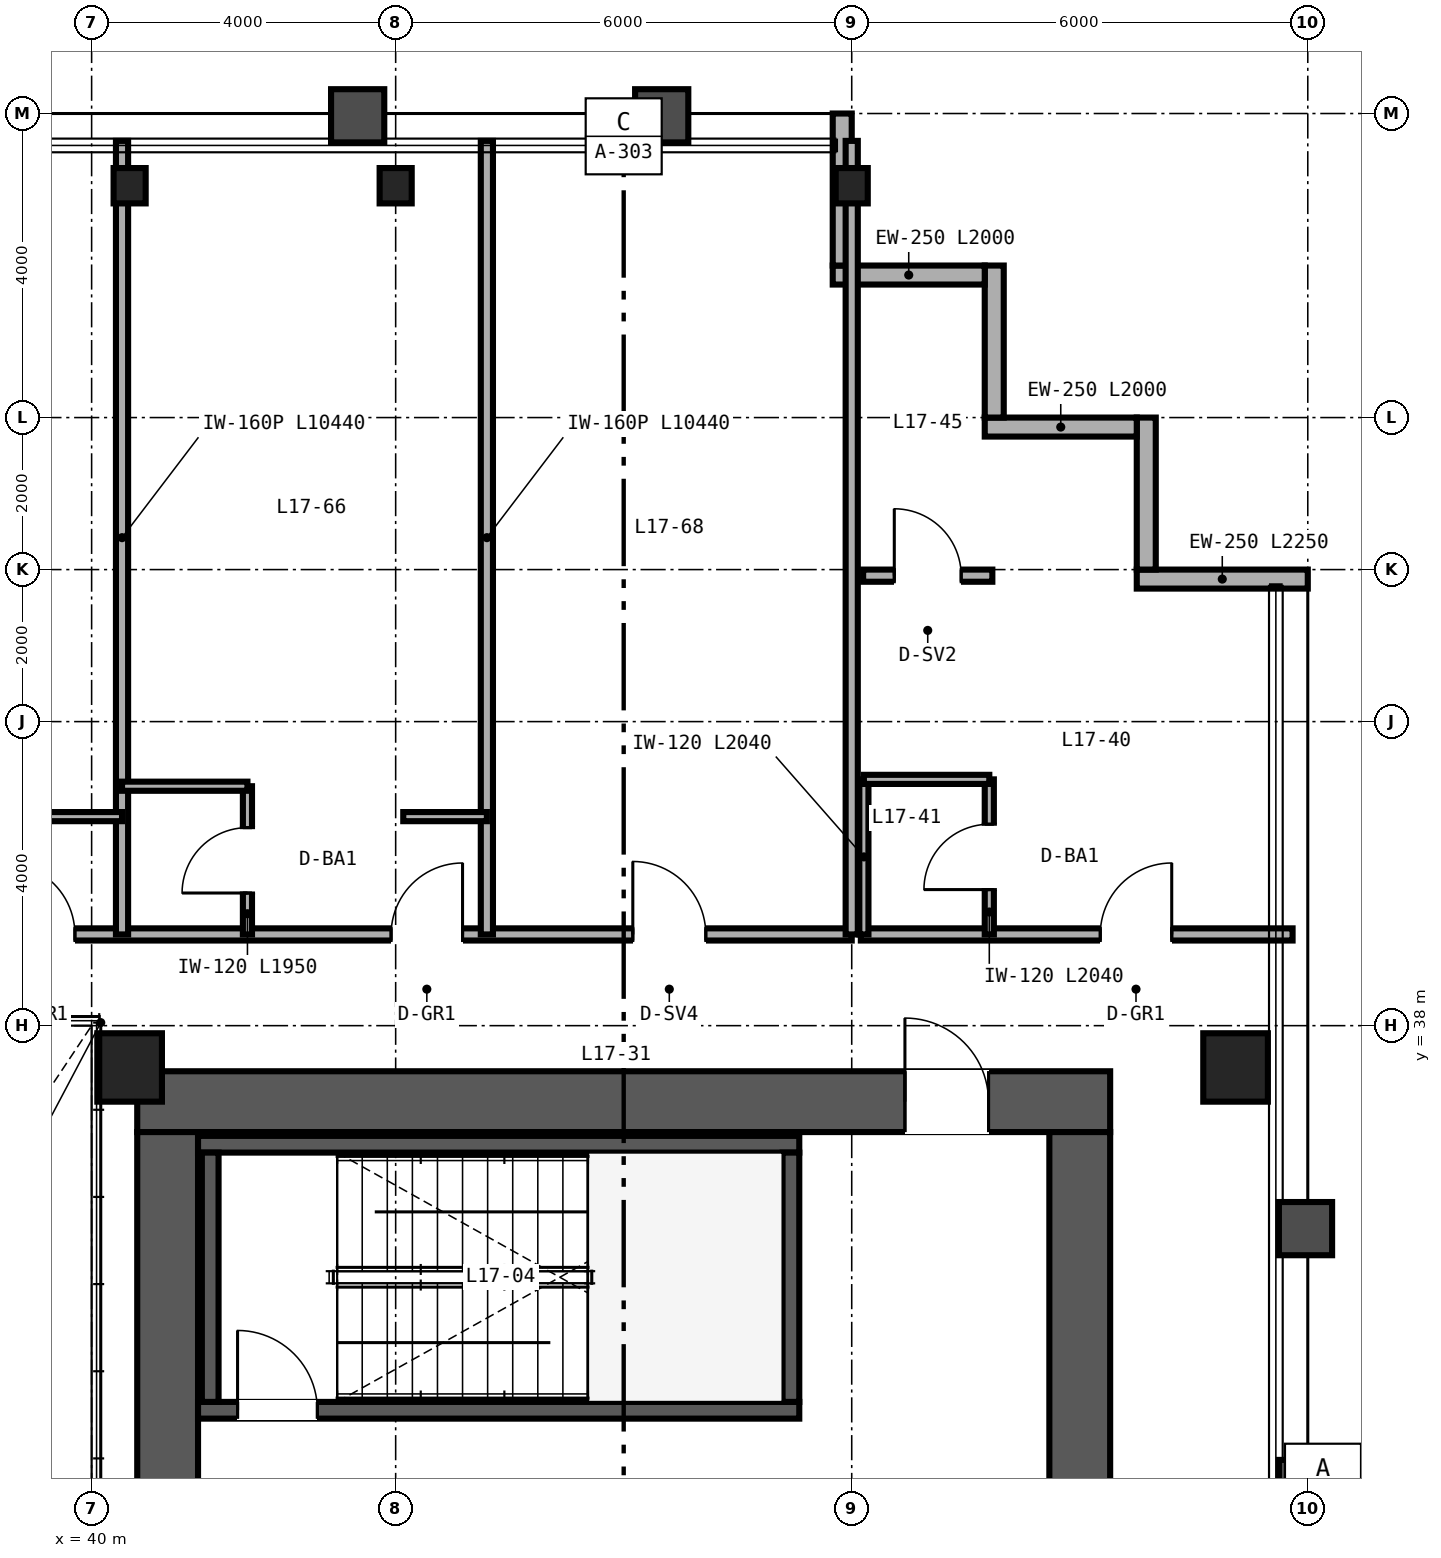
"""IFC4 building model, lengths in metres.
Left out: names, types, materials, properties, quantities, classifications, styles, units other than length and angle.
Written with IfcOpenShell. Run it as: python <this file> out.ifc"""

import sys

from ifc_helpers import new_model, si_unit, direction, frame, frame_2d, origin, origin_2d, place, context, subcontext, project, spatial, rectangle, hollow_rectangle, i_section, extrude, source, transform, mapped, element, fill, save


model = new_model("IFC4")
c1 = context("Model", 3, precision=1e-05, world=origin(), true_north=direction((0.0, 1.0)))
c2 = subcontext(c1, "Body", "Model", "MODEL_VIEW")
j1 = project(units=[si_unit("LENGTHUNIT", "METRE"), si_unit("PLANEANGLEUNIT", "RADIAN")], contexts=[c1])
p1 = place(None, origin())
s1 = spatial("IfcSite", under=j1, at=p1, CompositionType="ELEMENT")
p2 = place(p1, origin())
s2 = spatial("IfcBuilding", under=s1, at=p2, CompositionType="ELEMENT")
p3 = place(p2, frame((0.0, 0.0, 70.8)))
s3 = spatial("IfcBuildingStorey", under=s2, at=p3, CompositionType="ELEMENT", Elevation=70.8)
p4 = place(p3, frame((40.6, 37.0, 0.0), z_axis=(0.0, 0.0, 1.0), x_axis=(1.0, 0.0, 0.0)))
e1 = element("IfcWall", 1, at=p4, inside=s3, PredefinedType="SHEAR", context=c2, shape_type="SweptSolid", body=[
    extrude(rectangle(XDim=12.8, YDim=0.8, at=frame_2d((6.4, 0.0))), origin(), (0.0, 0.0, 1.0), 3.35),
])
p5 = place(p4, frame((10.1, 0.0, 0.0)))
e2 = element("IfcOpeningElement", 2, at=p5, cuts=e1, PredefinedType="OPENING", context=c2, shape_type="SweptSolid", body=[
    extrude(rectangle(XDim=1.1, YDim=2.15, at=frame_2d((0.55, 1.075))), frame((0.0, 0.41, 0.0), z_axis=(0.0, -1.0, 0.0), x_axis=(1.0, 0.0, 0.0)), (0.0, 0.0, 1.0), 0.82),
])
for number, where, z_axis, x_axis in (
    (3, (41.0, 15.4, 0.0), (0.0, 0.0, 1.0), (0.0, 1.0, 0.0)),
    (4, (53.0, 15.4, 0.0), (0.0, 0.0, 1.0), (0.0, 1.0, 0.0)),
):
    element("IfcWall", number, at=place(p3, frame(where, z_axis=z_axis, x_axis=x_axis)), inside=s3, PredefinedType="SHEAR", context=c2, shape_type="SweptSolid", body=[
        extrude(rectangle(XDim=21.2, YDim=0.8, at=frame_2d((10.6, 0.0))), origin(), (0.0, 0.0, 1.0), 3.35),
    ])
p6 = place(p3, frame((41.4, 32.94, 0.0), z_axis=(0.0, 0.0, 1.0), x_axis=(1.0, 0.0, 0.0)))
e5 = element("IfcWall", 5, at=p6, inside=s3, PredefinedType="SHEAR", context=c2, shape_type="SweptSolid", body=[
    extrude(rectangle(XDim=7.91, YDim=0.22, at=frame_2d((3.955, 0.0))), origin(), (0.0, 0.0, 1.0), 3.4),
])
p7 = place(p6, frame((0.52, 0.0, 0.0)))
e6 = element("IfcOpeningElement", 6, at=p7, cuts=e5, PredefinedType="OPENING", context=c2, shape_type="SweptSolid", body=[
    extrude(rectangle(XDim=1.05, YDim=2.15, at=frame_2d((0.525, 1.075))), frame((0.0, 0.12, 0.0), z_axis=(0.0, -1.0, 0.0), x_axis=(1.0, 0.0, 0.0)), (0.0, 0.0, 1.0), 0.24),
])
p8 = place(p3, frame((41.4, 36.44, 0.0), z_axis=(0.0, 0.0, 1.0), x_axis=(1.0, 0.0, 0.0)))
e7 = element("IfcWall", 7, at=p8, inside=s3, PredefinedType="SHEAR", context=c2, shape_type="SweptSolid", body=[
    extrude(rectangle(XDim=7.91, YDim=0.22, at=frame_2d((3.955, 0.0))), origin(), (0.0, 0.0, 1.0), 3.4),
])
for number, where, z_axis, x_axis in (
    (8, (41.56, 33.05, 0.0), (0.0, 0.0, 1.0), (0.0, 1.0, 0.0)),
    (9, (49.2, 33.05, 0.0), (0.0, 0.0, 1.0), (0.0, 1.0, 0.0)),
):
    element("IfcWall", number, at=place(p3, frame(where, z_axis=z_axis, x_axis=x_axis)), inside=s3, PredefinedType="SHEAR", context=c2, shape_type="SweptSolid", body=[
        extrude(rectangle(XDim=3.28, YDim=0.22, at=frame_2d((1.64, 0.0))), origin(), (0.0, 0.0, 1.0), 3.4),
    ])
m1 = source(origin(), c2, "Body", "SweptSolid", [
    extrude(hollow_rectangle(XDim=0.85, YDim=0.9, WallThickness=0.04, at=origin_2d()), origin(), (0.0, 0.0, 1.0), 3.35),
])
for number, where, z_axis, x_axis in (
    (10, (40.5, 37.45, 0.0), (0.0, 0.0, 1.0), (1.0, 0.0, 0.0)),
    (11, (55.05, 37.45, 0.0), (0.0, 0.0, 1.0), (1.0, 0.0, 0.0)),
):
    element("IfcColumn", number, at=place(p3, frame(where, z_axis=z_axis, x_axis=x_axis)), inside=s3, PredefinedType="COLUMN", context=c2, shape_type="MappedRepresentation", body=[
        mapped(m1, transform((0.0, 0.0, 0.0), scale=1.0)),
    ])
m2 = source(origin(), c2, "Body", "SweptSolid", [
    extrude(i_section(OverallWidth=0.422, OverallDepth=0.465, WebThickness=0.045, FlangeThickness=0.073, FilletRadius=0.025, at=origin_2d()), origin(), (0.0, 0.0, 1.0), 3.35),
])
for number, where, z_axis, x_axis in (
    (12, (40.5, 49.05, 0.0), (0.0, 0.0, 1.0), (1.0, 0.0, 0.0)),
    (13, (44.0, 49.05, 0.0), (0.0, 0.0, 1.0), (1.0, 0.0, 0.0)),
    (14, (50.0, 49.05, 0.0), (0.0, 0.0, 1.0), (1.0, 0.0, 0.0)),
):
    element("IfcColumn", number, at=place(p3, frame(where, z_axis=z_axis, x_axis=x_axis)), inside=s3, PredefinedType="COLUMN", context=c2, shape_type="MappedRepresentation", body=[
        mapped(m2, transform((0.0, 0.0, 0.0), scale=1.0)),
    ])
p9 = place(p3, frame((56.0, 43.875, 0.0), z_axis=(0.0, 0.0, 1.0), x_axis=(-1.0, 0.0, 0.0)))
e15 = element("IfcWall", 15, at=p9, inside=s3, PredefinedType="SOLIDWALL", context=c2, shape_type="SweptSolid", body=[
    extrude(rectangle(XDim=2.25, YDim=0.25, at=frame_2d((1.125, 0.0))), origin(), (0.0, 0.0, 1.0), 3.35),
])
for number, where, z_axis, x_axis in (
    (16, (53.875, 44.0, 0.0), (0.0, 0.0, 1.0), (0.0, 1.0, 0.0)),
    (17, (53.75, 45.875, 0.0), (0.0, 0.0, 1.0), (-1.0, 0.0, 0.0)),
    (18, (51.875, 46.0, 0.0), (0.0, 0.0, 1.0), (0.0, 1.0, 0.0)),
    (19, (51.75, 47.875, 0.0), (0.0, 0.0, 1.0), (-1.0, 0.0, 0.0)),
):
    element("IfcWall", number, at=place(p3, frame(where, z_axis=z_axis, x_axis=x_axis)), inside=s3, PredefinedType="SOLIDWALL", context=c2, shape_type="SweptSolid", body=[
        extrude(rectangle(XDim=2.0, YDim=0.25, at=frame_2d((1.0, 0.0))), origin(), (0.0, 0.0, 1.0), 3.35),
    ])
p10 = place(p3, frame((49.875, 48.0, 0.0), z_axis=(0.0, 0.0, 1.0), x_axis=(0.0, 1.0, 0.0)))
e20 = element("IfcWall", 20, at=p10, inside=s3, PredefinedType="SOLIDWALL", context=c2, shape_type="SweptSolid", body=[
    extrude(rectangle(XDim=2.0, YDim=0.25, at=frame_2d((1.0, 0.0))), origin(), (0.0, 0.0, 1.0), 2.657),
])
p11 = place(p3, frame((50.12, 39.2, 0.0), z_axis=(0.0, 0.0, 1.0), x_axis=(1.0, 0.0, 0.0)))
e21 = element("IfcWall", 21, at=p11, inside=s3, PredefinedType="PARTITIONING", context=c2, shape_type="SweptSolid", body=[
    extrude(rectangle(XDim=5.68, YDim=0.16, at=frame_2d((2.84, 0.0))), origin(), (0.0, 0.0, 1.0), 3.35),
])
p12 = place(p11, frame((3.15, 0.0, 0.0)))
e22 = element("IfcOpeningElement", 22, at=p12, cuts=e21, PredefinedType="OPENING", context=c2, shape_type="SweptSolid", body=[
    extrude(rectangle(XDim=0.94, YDim=2.15, at=frame_2d((0.47, 1.075))), frame((0.0, 0.09, 0.0), z_axis=(0.0, -1.0, 0.0), x_axis=(1.0, 0.0, 0.0)), (0.0, 0.0, 1.0), 0.18),
])
p13 = place(p3, frame((51.81, 39.2, 0.0), z_axis=(0.0, 0.0, 1.0), x_axis=(0.0, 1.0, 0.0)))
e23 = element("IfcWall", 23, at=p13, inside=s3, PredefinedType="PARTITIONING", context=c2, shape_type="SweptSolid", body=[
    extrude(rectangle(XDim=2.04, YDim=0.12, at=frame_2d((1.02, 0.0))), origin(), (0.0, 0.0, 1.0), 3.35),
])
p14 = place(p13, frame((0.59, 0.0, 0.0)))
e24 = element("IfcOpeningElement", 24, at=p14, cuts=e23, PredefinedType="OPENING", context=c2, shape_type="SweptSolid", body=[
    extrude(rectangle(XDim=0.86, YDim=2.1, at=frame_2d((0.43, 1.05))), frame((0.0, 0.07, 0.0), z_axis=(0.0, -1.0, 0.0), x_axis=(1.0, 0.0, 0.0)), (0.0, 0.0, 1.0), 0.14),
])
p15 = place(p3, frame((50.16, 39.2, 0.0), z_axis=(0.0, 0.0, 1.0), x_axis=(0.0, 1.0, 0.0)))
e25 = element("IfcWall", 25, at=p15, inside=s3, PredefinedType="PARTITIONING", context=c2, shape_type="SweptSolid", body=[
    extrude(rectangle(XDim=2.04, YDim=0.12, at=frame_2d((1.02, 0.0))), origin(), (0.0, 0.0, 1.0), 3.35),
])
p16 = place(p3, frame((50.16, 41.24, 0.0), z_axis=(0.0, 0.0, 1.0), x_axis=(1.0, 0.0, 0.0)))
e26 = element("IfcWall", 26, at=p16, inside=s3, PredefinedType="PARTITIONING", context=c2, shape_type="SweptSolid", body=[
    extrude(rectangle(XDim=1.65, YDim=0.12, at=frame_2d((0.825, 0.0))), origin(), (0.0, 0.0, 1.0), 3.35),
])
p17 = place(p3, frame((50.15, 43.92, 0.0), z_axis=(0.0, 0.0, 1.0), x_axis=(1.0, 0.0, 0.0)))
e27 = element("IfcWall", 27, at=p17, inside=s3, PredefinedType="PARTITIONING", context=c2, shape_type="SweptSolid", body=[
    extrude(rectangle(XDim=1.7, YDim=0.16, at=frame_2d((0.85, 0.0))), origin(), (0.0, 0.0, 1.0), 3.35),
])
p18 = place(p17, frame((0.41, 0.0, 0.0)))
e28 = element("IfcOpeningElement", 28, at=p18, cuts=e27, PredefinedType="OPENING", context=c2, shape_type="SweptSolid", body=[
    extrude(rectangle(XDim=0.88, YDim=2.15, at=frame_2d((0.44, 1.075))), frame((0.0, 0.09, 0.0), z_axis=(0.0, -1.0, 0.0), x_axis=(1.0, 0.0, 0.0)), (0.0, 0.0, 1.0), 0.18),
])
p19 = place(p3, frame((14.0, 39.2, 0.0), z_axis=(0.0, 0.0, 1.0), x_axis=(1.0, 0.0, 0.0)))
e29 = element("IfcWall", 29, at=p19, inside=s3, PredefinedType="PARTITIONING", context=c2, shape_type="SweptSolid", body=[
    extrude(rectangle(XDim=36.0, YDim=0.16, at=frame_2d((18.0, 0.0))), origin(), (0.0, 0.0, 1.0), 2.571),
])
p20 = place(p19, frame((3.74, 0.0, 0.0)))
e30 = element("IfcOpeningElement", 30, at=p20, cuts=e29, PredefinedType="OPENING", context=c2, shape_type="SweptSolid", body=[
    extrude(rectangle(XDim=0.94, YDim=2.15, at=frame_2d((0.47, 1.075))), frame((0.0, 0.09, 0.0), z_axis=(0.0, -1.0, 0.0), x_axis=(1.0, 0.0, 0.0)), (0.0, 0.0, 1.0), 0.18),
])
p21 = place(p19, frame((7.79, 0.0, 0.0)))
e31 = element("IfcOpeningElement", 31, at=p21, cuts=e29, PredefinedType="OPENING", context=c2, shape_type="SweptSolid", body=[
    extrude(rectangle(XDim=0.94, YDim=2.15, at=frame_2d((0.47, 1.075))), frame((0.0, 0.09, 0.0), z_axis=(0.0, -1.0, 0.0), x_axis=(1.0, 0.0, 0.0)), (0.0, 0.0, 1.0), 0.18),
])
p22 = place(p19, frame((12.22, 0.0, 0.0)))
e32 = element("IfcOpeningElement", 32, at=p22, cuts=e29, PredefinedType="OPENING", context=c2, shape_type="SweptSolid", body=[
    extrude(rectangle(XDim=0.96, YDim=2.15, at=frame_2d((0.48, 1.075))), frame((0.0, 0.09, 0.0), z_axis=(0.0, -1.0, 0.0), x_axis=(1.0, 0.0, 0.0)), (0.0, 0.0, 1.0), 0.18),
])
p23 = place(p19, frame((19.94, 0.0, 0.0)))
e33 = element("IfcOpeningElement", 33, at=p23, cuts=e29, PredefinedType="OPENING", context=c2, shape_type="SweptSolid", body=[
    extrude(rectangle(XDim=0.94, YDim=2.15, at=frame_2d((0.47, 1.075))), frame((0.0, 0.09, 0.0), z_axis=(0.0, -1.0, 0.0), x_axis=(1.0, 0.0, 0.0)), (0.0, 0.0, 1.0), 0.18),
])
p24 = place(p19, frame((24.84, 0.0, 0.0)))
e34 = element("IfcOpeningElement", 34, at=p24, cuts=e29, PredefinedType="OPENING", context=c2, shape_type="SweptSolid", body=[
    extrude(rectangle(XDim=0.94, YDim=2.15, at=frame_2d((0.47, 1.075))), frame((0.0, 0.09, 0.0), z_axis=(0.0, -1.0, 0.0), x_axis=(1.0, 0.0, 0.0)), (0.0, 0.0, 1.0), 0.18),
])
p25 = place(p19, frame((29.94, 0.0, 0.0)))
e35 = element("IfcOpeningElement", 35, at=p25, cuts=e29, PredefinedType="OPENING", context=c2, shape_type="SweptSolid", body=[
    extrude(rectangle(XDim=0.94, YDim=2.15, at=frame_2d((0.47, 1.075))), frame((0.0, 0.09, 0.0), z_axis=(0.0, -1.0, 0.0), x_axis=(1.0, 0.0, 0.0)), (0.0, 0.0, 1.0), 0.18),
])
p26 = place(p19, frame((33.12, 0.0, 0.0)))
e36 = element("IfcOpeningElement", 36, at=p26, cuts=e29, PredefinedType="OPENING", context=c2, shape_type="SweptSolid", body=[
    extrude(rectangle(XDim=0.96, YDim=2.15, at=frame_2d((0.48, 1.075))), frame((0.0, 0.09, 0.0), z_axis=(0.0, -1.0, 0.0), x_axis=(1.0, 0.0, 0.0)), (0.0, 0.0, 1.0), 0.18),
])
p27 = place(p3, frame((50.0, 39.2, 0.0), z_axis=(0.0, 0.0, 1.0), x_axis=(0.0, 1.0, 0.0)))
e37 = element("IfcWall", 37, at=p27, inside=s3, PredefinedType="PARTITIONING", context=c2, shape_type="SweptSolid", body=[
    extrude(rectangle(XDim=10.44, YDim=0.16, at=frame_2d((5.22, 0.0))), origin(), (0.0, 0.0, 1.0), 2.657),
])
p28 = place(p3, frame((40.4, 39.2, 0.0), z_axis=(0.0, 0.0, 1.0), x_axis=(0.0, 1.0, 0.0)))
e38 = element("IfcWall", 38, at=p28, inside=s3, PredefinedType="PARTITIONING", context=c2, shape_type="SweptSolid", body=[
    extrude(rectangle(XDim=10.44, YDim=0.16, at=frame_2d((5.22, 0.0))), origin(), (0.0, 0.0, 1.0), 2.423),
])
p29 = place(p3, frame((39.3, 40.75, 0.0), z_axis=(0.0, 0.0, 1.0), x_axis=(1.0, 0.0, 0.0)))
e39 = element("IfcWall", 39, at=p29, inside=s3, PredefinedType="PARTITIONING", context=c2, shape_type="SweptSolid", body=[
    extrude(rectangle(XDim=1.1, YDim=0.12, at=frame_2d((0.55, 0.0))), origin(), (0.0, 0.0, 1.0), 2.571),
])
p30 = place(p3, frame((45.2, 39.2, 0.0), z_axis=(0.0, 0.0, 1.0), x_axis=(0.0, 1.0, 0.0)))
e40 = element("IfcWall", 40, at=p30, inside=s3, PredefinedType="PARTITIONING", context=c2, shape_type="SweptSolid", body=[
    extrude(rectangle(XDim=10.44, YDim=0.16, at=frame_2d((5.22, 0.0))), origin(), (0.0, 0.0, 1.0), 2.657),
])
p31 = place(p3, frame((42.05, 39.2, 0.0), z_axis=(0.0, 0.0, 1.0), x_axis=(0.0, 1.0, 0.0)))
e41 = element("IfcWall", 41, at=p31, inside=s3, PredefinedType="PARTITIONING", context=c2, shape_type="SweptSolid", body=[
    extrude(rectangle(XDim=1.95, YDim=0.12, at=frame_2d((0.975, 0.0))), origin(), (0.0, 0.0, 1.0), 3.35),
])
p32 = place(p31, frame((0.545, 0.0, 0.0)))
e42 = element("IfcOpeningElement", 42, at=p32, cuts=e41, PredefinedType="OPENING", context=c2, shape_type="SweptSolid", body=[
    extrude(rectangle(XDim=0.86, YDim=2.1, at=frame_2d((0.43, 1.05))), frame((0.0, 0.07, 0.0), z_axis=(0.0, -1.0, 0.0), x_axis=(1.0, 0.0, 0.0)), (0.0, 0.0, 1.0), 0.14),
])
p33 = place(p3, frame((40.4, 41.15, 0.0), z_axis=(0.0, 0.0, 1.0), x_axis=(1.0, 0.0, 0.0)))
e43 = element("IfcWall", 43, at=p33, inside=s3, PredefinedType="PARTITIONING", context=c2, shape_type="SweptSolid", body=[
    extrude(rectangle(XDim=1.65, YDim=0.12, at=frame_2d((0.825, 0.0))), origin(), (0.0, 0.0, 1.0), 2.571),
])
p34 = place(p3, frame((44.1, 40.75, 0.0), z_axis=(0.0, 0.0, 1.0), x_axis=(1.0, 0.0, 0.0)))
e44 = element("IfcWall", 44, at=p34, inside=s3, PredefinedType="PARTITIONING", context=c2, shape_type="SweptSolid", body=[
    extrude(rectangle(XDim=1.1, YDim=0.12, at=frame_2d((0.55, 0.0))), origin(), (0.0, 0.0, 1.0), 3.35),
])
m3 = source(origin(), c2, "Body", "SweptSolid", [
    extrude(rectangle(XDim=1.05, YDim=2.15, at=frame_2d((0.525, 1.075))), frame((0.0, 0.025, 0.0), z_axis=(0.0, -1.0, 0.0), x_axis=(1.0, 0.0, 0.0)), (0.0, 0.0, 1.0), 0.05),
])
p35 = place(p7, origin())
e45 = element("IfcDoor", 45, at=p35, inside=s3, OperationType="SINGLE_SWING_LEFT", PredefinedType="DOOR", context=c2, shape_type="MappedRepresentation", body=[
    mapped(m3, transform((0.0, 0.0, 0.0), scale=1.0)),
])
fill(e6, e45)
m4 = source(origin(), c2, "Body", "SweptSolid", [
    extrude(rectangle(XDim=1.1, YDim=2.15, at=frame_2d((0.55, 1.075))), frame((0.0, 0.025, 0.0), z_axis=(0.0, -1.0, 0.0), x_axis=(1.0, 0.0, 0.0)), (0.0, 0.0, 1.0), 0.05),
])
p36 = place(p5, origin())
e46 = element("IfcDoor", 46, at=p36, inside=s3, OperationType="SINGLE_SWING_LEFT", PredefinedType="DOOR", context=c2, shape_type="MappedRepresentation", body=[
    mapped(m4, transform((0.0, 0.0, 0.0), scale=1.0)),
])
fill(e2, e46)
m5 = source(origin(), c2, "Body", "SweptSolid", [
    extrude(rectangle(XDim=0.86, YDim=2.1, at=frame_2d((0.43, 1.05))), frame((0.0, 0.025, 0.0), z_axis=(0.0, -1.0, 0.0), x_axis=(1.0, 0.0, 0.0)), (0.0, 0.0, 1.0), 0.05),
])
p37 = place(p14, origin())
e47 = element("IfcDoor", 47, at=p37, inside=s3, OperationType="SINGLE_SWING_LEFT", PredefinedType="DOOR", context=c2, shape_type="MappedRepresentation", body=[
    mapped(m5, transform((0.0, 0.0, 0.0), scale=1.0)),
])
fill(e24, e47)
m6 = source(origin(), c2, "Body", "SweptSolid", [
    extrude(rectangle(XDim=0.94, YDim=2.15, at=frame_2d((0.47, 1.075))), frame((0.0, 0.025, 0.0), z_axis=(0.0, -1.0, 0.0), x_axis=(1.0, 0.0, 0.0)), (0.0, 0.0, 1.0), 0.05),
])
p38 = place(p12, origin())
e48 = element("IfcDoor", 48, at=p38, inside=s3, OperationType="SINGLE_SWING_RIGHT", PredefinedType="DOOR", context=c2, shape_type="MappedRepresentation", body=[
    mapped(m6, transform((0.0, 0.0, 0.0), scale=1.0)),
])
fill(e22, e48)
m7 = source(origin(), c2, "Body", "SweptSolid", [
    extrude(rectangle(XDim=0.88, YDim=2.15, at=frame_2d((0.44, 1.075))), frame((0.0, 0.025, 0.0), z_axis=(0.0, -1.0, 0.0), x_axis=(1.0, 0.0, 0.0)), (0.0, 0.0, 1.0), 0.05),
])
p39 = place(p18, origin())
e49 = element("IfcDoor", 49, at=p39, inside=s3, OperationType="SINGLE_SWING_LEFT", PredefinedType="DOOR", context=c2, shape_type="MappedRepresentation", body=[
    mapped(m7, transform((0.0, 0.0, 0.0), scale=1.0)),
])
fill(e28, e49)
p40 = place(p32, origin())
e50 = element("IfcDoor", 50, at=p40, inside=s3, OperationType="SINGLE_SWING_LEFT", PredefinedType="DOOR", context=c2, shape_type="MappedRepresentation", body=[
    mapped(m5, transform((0.0, 0.0, 0.0), scale=1.0)),
])
fill(e42, e50)
p41 = place(p24, origin())
e51 = element("IfcDoor", 51, at=p41, inside=s3, OperationType="SINGLE_SWING_LEFT", PredefinedType="DOOR", context=c2, shape_type="MappedRepresentation", body=[
    mapped(m6, transform((0.0, 0.0, 0.0), scale=1.0)),
])
fill(e34, e51)
p42 = place(p25, origin())
e52 = element("IfcDoor", 52, at=p42, inside=s3, OperationType="SINGLE_SWING_RIGHT", PredefinedType="DOOR", context=c2, shape_type="MappedRepresentation", body=[
    mapped(m6, transform((0.0, 0.0, 0.0), scale=1.0)),
])
fill(e35, e52)
m8 = source(origin(), c2, "Body", "SweptSolid", [
    extrude(rectangle(XDim=0.96, YDim=2.15, at=frame_2d((0.48, 1.075))), frame((0.0, 0.025, 0.0), z_axis=(0.0, -1.0, 0.0), x_axis=(1.0, 0.0, 0.0)), (0.0, 0.0, 1.0), 0.05),
])
p43 = place(p26, origin())
e53 = element("IfcDoor", 53, at=p43, inside=s3, OperationType="SINGLE_SWING_LEFT", PredefinedType="DOOR", context=c2, shape_type="MappedRepresentation", body=[
    mapped(m8, transform((0.0, 0.0, 0.0), scale=1.0)),
])
fill(e36, e53)
save(model, sys.argv[1])
